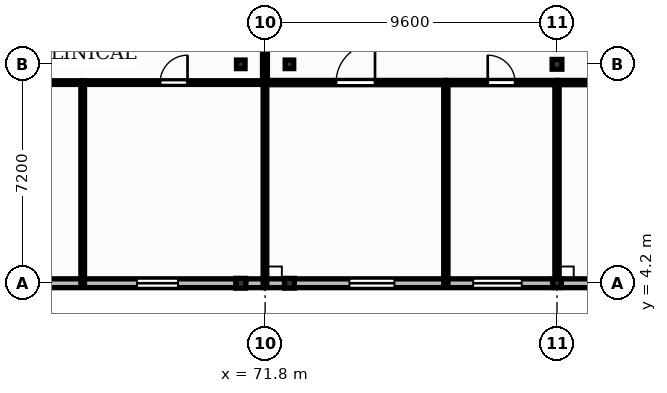
"""IFC4 building model, lengths in metres.
Left out: names, types, materials, properties, quantities, classifications, styles, units other than length and angle.
Written with IfcOpenShell. Run it as: python <this file> out.ifc"""

import sys

from ifc_helpers import new_model, si_unit, direction, frame, frame_2d, origin, origin_2d, place, context, subcontext, project, spatial, rectangle, extrude, element, fill, save


model = new_model("IFC4")
c1 = context("Model", 3, precision=1e-05, world=origin(), true_north=direction((0.0, 1.0)))
c2 = subcontext(c1, "Body", "Model", "MODEL_VIEW")
j1 = project(units=[si_unit("LENGTHUNIT", "METRE"), si_unit("PLANEANGLEUNIT", "RADIAN")], contexts=[c1])
p1 = place(None, origin())
s1 = spatial("IfcSite", under=j1, at=p1, CompositionType="ELEMENT")
p2 = place(p1, origin())
s2 = spatial("IfcBuilding", under=s1, at=p2, CompositionType="ELEMENT")
p3 = place(p2, frame((0.0, 0.0, 13.2)))
s3 = spatial("IfcBuildingStorey", under=s2, at=p3, CompositionType="ELEMENT", Elevation=13.2)
p4 = place(p3, frame((72.6, 4.2, 0.0), z_axis=(0.0, 0.0, 1.0), x_axis=(1.0, 0.0, 0.0)))
e1 = element("IfcColumn", 1, at=p4, inside=s3, PredefinedType="COLUMN", context=c2, shape_type="SweptSolid", body=[
    extrude(rectangle(XDim=0.32, YDim=0.32, at=origin_2d()), origin(), (0.0, 0.0, 1.0), 3.98),
])
p5 = place(p3, frame((72.6, 11.4, 0.0), z_axis=(0.0, 0.0, 1.0), x_axis=(1.0, 0.0, 0.0)))
e2 = element("IfcColumn", 2, at=p5, inside=s3, PredefinedType="COLUMN", context=c2, shape_type="SweptSolid", body=[
    extrude(rectangle(XDim=0.28, YDim=0.28, at=origin_2d()), origin(), (0.0, 0.0, 1.0), 6.045),
])
p6 = place(p3, frame((81.4, 4.2, 0.0), z_axis=(0.0, 0.0, 1.0), x_axis=(1.0, 0.0, 0.0)))
e3 = element("IfcColumn", 3, at=p6, inside=s3, PredefinedType="COLUMN", context=c2, shape_type="SweptSolid", body=[
    extrude(rectangle(XDim=0.28, YDim=0.28, at=origin_2d()), origin(), (0.0, 0.0, 1.0), 3.98),
])
p7 = place(p3, frame((81.4, 11.4, 0.0), z_axis=(0.0, 0.0, 1.0), x_axis=(1.0, 0.0, 0.0)))
e4 = element("IfcColumn", 4, at=p7, inside=s3, PredefinedType="COLUMN", context=c2, shape_type="SweptSolid", body=[
    extrude(rectangle(XDim=0.32, YDim=0.32, at=origin_2d()), origin(), (0.0, 0.0, 1.0), 6.045),
])
p8 = place(p3, frame((71.0, 4.2, 0.0), z_axis=(0.0, 0.0, 1.0), x_axis=(1.0, 0.0, 0.0)))
e5 = element("IfcColumn", 5, at=p8, inside=s3, PredefinedType="COLUMN", context=c2, shape_type="SweptSolid", body=[
    extrude(rectangle(XDim=0.32, YDim=0.32, at=origin_2d()), origin(), (0.0, 0.0, 1.0), 3.98),
])
p9 = place(p3, frame((71.0, 11.4, 0.0), z_axis=(0.0, 0.0, 1.0), x_axis=(1.0, 0.0, 0.0)))
e6 = element("IfcColumn", 6, at=p9, inside=s3, PredefinedType="COLUMN", context=c2, shape_type="SweptSolid", body=[
    extrude(rectangle(XDim=0.28, YDim=0.28, at=origin_2d()), origin(), (0.0, 0.0, 1.0), 6.045),
])
p10 = place(p3, frame((62.34, 4.2, 0.0), z_axis=(0.0, 0.0, 1.0), x_axis=(1.0, 0.0, 0.0)))
e7 = element("IfcWall", 7, at=p10, inside=s3, PredefinedType="SOLIDWALL", context=c2, shape_type="SweptSolid", body=[
    extrude(rectangle(XDim=8.5, YDim=0.29, at=frame_2d((4.25, 0.0))), origin(), (0.0, 0.0, 1.0), 4.0),
])
p11 = place(p10, frame((1.18, 0.0, 1.0)))
e8 = element("IfcOpeningElement", 8, at=p11, cuts=e7, PredefinedType="OPENING", context=c2, shape_type="SweptSolid", body=[
    extrude(rectangle(XDim=1.22, YDim=2.2, at=frame_2d((0.61, 1.1))), frame((0.0, 0.155, 0.0), z_axis=(0.0, -1.0, 0.0), x_axis=(1.0, 0.0, 0.0)), (0.0, 0.0, 1.0), 0.31),
])
p12 = place(p10, frame((5.245, 0.0, 1.0)))
e9 = element("IfcOpeningElement", 9, at=p12, cuts=e7, PredefinedType="OPENING", context=c2, shape_type="SweptSolid", body=[
    extrude(rectangle(XDim=1.35, YDim=2.2, at=frame_2d((0.675, 1.1))), frame((0.0, 0.155, 0.0), z_axis=(0.0, -1.0, 0.0), x_axis=(1.0, 0.0, 0.0)), (0.0, 0.0, 1.0), 0.31),
])
p13 = place(p3, frame((71.16, 4.2, 0.0), z_axis=(0.0, 0.0, 1.0), x_axis=(1.0, 0.0, 0.0)))
e10 = element("IfcWall", 10, at=p13, inside=s3, PredefinedType="SOLIDWALL", context=c2, shape_type="SweptSolid", body=[
    extrude(rectangle(XDim=0.595, YDim=0.29, at=frame_2d((0.297, 0.0))), origin(), (0.0, 0.0, 1.0), 4.0),
])
p14 = place(p3, frame((71.805, 4.2, 0.0), z_axis=(0.0, 0.0, 1.0), x_axis=(1.0, 0.0, 0.0)))
e11 = element("IfcWall", 11, at=p14, inside=s3, PredefinedType="SOLIDWALL", context=c2, shape_type="SweptSolid", body=[
    extrude(rectangle(XDim=0.635, YDim=0.29, at=frame_2d((0.317, 0.0))), origin(), (0.0, 0.0, 1.0), 4.0),
])
p15 = place(p3, frame((72.76, 4.2, 0.0), z_axis=(0.0, 0.0, 1.0), x_axis=(1.0, 0.0, 0.0)))
e12 = element("IfcWall", 12, at=p15, inside=s3, PredefinedType="SOLIDWALL", context=c2, shape_type="SweptSolid", body=[
    extrude(rectangle(XDim=8.5, YDim=0.29, at=frame_2d((4.25, 0.0))), origin(), (0.0, 0.0, 1.0), 4.0),
])
p16 = place(p15, frame((1.812, 0.0, 1.0)))
e13 = element("IfcOpeningElement", 13, at=p16, cuts=e12, PredefinedType="OPENING", context=c2, shape_type="SweptSolid", body=[
    extrude(rectangle(XDim=1.48, YDim=2.2, at=frame_2d((0.74, 1.1))), frame((0.0, 0.155, 0.0), z_axis=(0.0, -1.0, 0.0), x_axis=(1.0, 0.0, 0.0)), (0.0, 0.0, 1.0), 0.31),
])
p17 = place(p15, frame((5.882, 0.0, 1.0)))
e14 = element("IfcOpeningElement", 14, at=p17, cuts=e12, PredefinedType="OPENING", context=c2, shape_type="SweptSolid", body=[
    extrude(rectangle(XDim=1.6, YDim=2.2, at=frame_2d((0.8, 1.1))), frame((0.0, 0.155, 0.0), z_axis=(0.0, -1.0, 0.0), x_axis=(1.0, 0.0, 0.0)), (0.0, 0.0, 1.0), 0.31),
])
p18 = place(p3, frame((81.54, 4.2, 0.0), z_axis=(0.0, 0.0, 1.0), x_axis=(1.0, 0.0, 0.0)))
e15 = element("IfcWall", 15, at=p18, inside=s3, PredefinedType="SOLIDWALL", context=c2, shape_type="SweptSolid", body=[
    extrude(rectangle(XDim=4.54, YDim=0.29, at=frame_2d((2.27, 0.0))), origin(), (0.0, 0.0, 1.0), 4.0),
])
p19 = place(p18, frame((1.41, 0.0, 1.0)))
e16 = element("IfcOpeningElement", 16, at=p19, cuts=e15, PredefinedType="OPENING", context=c2, shape_type="SweptSolid", body=[
    extrude(rectangle(XDim=1.72, YDim=2.2, at=frame_2d((0.86, 1.1))), frame((0.0, 0.155, 0.0), z_axis=(0.0, -1.0, 0.0), x_axis=(1.0, 0.0, 0.0)), (0.0, 0.0, 1.0), 0.31),
])
p20 = place(p3, frame((62.2, 10.8, 0.0), z_axis=(0.0, 0.0, 1.0), x_axis=(1.0, 0.0, 0.0)))
e17 = element("IfcWall", 17, at=p20, inside=s3, PredefinedType="PLUMBINGWALL", context=c2, shape_type="SweptSolid", body=[
    extrude(rectangle(XDim=3.6, YDim=0.12, at=frame_2d((1.8, 0.0))), origin(), (0.0, 0.0, 1.0), 3.75),
])
p21 = place(p20, frame((1.35, 0.0, 0.0)))
e18 = element("IfcOpeningElement", 18, at=p21, cuts=e17, PredefinedType="OPENING", context=c2, shape_type="SweptSolid", body=[
    extrude(rectangle(XDim=0.9, YDim=2.1, at=frame_2d((0.45, 1.05))), frame((0.0, 0.07, 0.0), z_axis=(0.0, -1.0, 0.0), x_axis=(1.0, 0.0, 0.0)), (0.0, 0.0, 1.0), 0.14),
])
p22 = place(p3, frame((65.8, 4.2, 0.0), z_axis=(0.0, 0.0, 1.0), x_axis=(0.0, 1.0, 0.0)))
e19 = element("IfcWall", 19, at=p22, inside=s3, PredefinedType="PLUMBINGWALL", context=c2, shape_type="SweptSolid", body=[
    extrude(rectangle(XDim=6.53, YDim=0.12, at=frame_2d((3.265, 0.0))), origin(), (0.0, 0.0, 1.0), 3.75),
])
p23 = place(p3, frame((65.8, 10.8, 0.0), z_axis=(0.0, 0.0, 1.0), x_axis=(1.0, 0.0, 0.0)))
e20 = element("IfcWall", 20, at=p23, inside=s3, PredefinedType="PLUMBINGWALL", context=c2, shape_type="SweptSolid", body=[
    extrude(rectangle(XDim=5.995, YDim=0.12, at=frame_2d((2.998, 0.0))), origin(), (0.0, 0.0, 1.0), 3.75),
])
p24 = place(p23, frame((2.548, 0.0, 0.0)))
e21 = element("IfcOpeningElement", 21, at=p24, cuts=e20, PredefinedType="OPENING", context=c2, shape_type="SweptSolid", body=[
    extrude(rectangle(XDim=0.9, YDim=2.1, at=frame_2d((0.45, 1.05))), frame((0.0, 0.07, 0.0), z_axis=(0.0, -1.0, 0.0), x_axis=(1.0, 0.0, 0.0)), (0.0, 0.0, 1.0), 0.14),
])
p25 = place(p3, frame((71.805, 10.8, 0.0), z_axis=(0.0, 0.0, 1.0), x_axis=(1.0, 0.0, 0.0)))
e22 = element("IfcWall", 22, at=p25, inside=s3, PredefinedType="PARTITIONING", context=c2, shape_type="SweptSolid", body=[
    extrude(rectangle(XDim=5.939, YDim=0.14, at=frame_2d((2.969, 0.0))), origin(), (0.0, 0.0, 1.0), 3.75),
])
p26 = place(p25, frame((2.33, 0.0, 0.0)))
e23 = element("IfcOpeningElement", 23, at=p26, cuts=e22, PredefinedType="OPENING", context=c2, shape_type="SweptSolid", body=[
    extrude(rectangle(XDim=1.28, YDim=2.2, at=frame_2d((0.64, 1.1))), frame((0.0, 0.08, 0.0), z_axis=(0.0, -1.0, 0.0), x_axis=(1.0, 0.0, 0.0)), (0.0, 0.0, 1.0), 0.16),
])
p27 = place(p3, frame((77.744, 4.2, 0.0), z_axis=(0.0, 0.0, 1.0), x_axis=(0.0, 1.0, 0.0)))
e24 = element("IfcWall", 24, at=p27, inside=s3, PredefinedType="PARTITIONING", context=c2, shape_type="SweptSolid", body=[
    extrude(rectangle(XDim=6.53, YDim=0.14, at=frame_2d((3.265, 0.0))), origin(), (0.0, 0.0, 1.0), 3.75),
])
p28 = place(p3, frame((77.744, 10.8, 0.0), z_axis=(0.0, 0.0, 1.0), x_axis=(1.0, 0.0, 0.0)))
e25 = element("IfcWall", 25, at=p28, inside=s3, PredefinedType="PARTITIONING", context=c2, shape_type="SweptSolid", body=[
    extrude(rectangle(XDim=3.656, YDim=0.14, at=frame_2d((1.828, 0.0))), origin(), (0.0, 0.0, 1.0), 3.75),
])
p29 = place(p28, frame((1.378, 0.0, 0.0)))
e26 = element("IfcOpeningElement", 26, at=p29, cuts=e25, PredefinedType="OPENING", context=c2, shape_type="SweptSolid", body=[
    extrude(rectangle(XDim=0.9, YDim=2.1, at=frame_2d((0.45, 1.05))), frame((0.0, 0.08, 0.0), z_axis=(0.0, -1.0, 0.0), x_axis=(1.0, 0.0, 0.0)), (0.0, 0.0, 1.0), 0.16),
])
p30 = place(p3, frame((81.4, 4.34, 0.0), z_axis=(0.0, 0.0, 1.0), x_axis=(0.0, 1.0, 0.0)))
e27 = element("IfcWall", 27, at=p30, inside=s3, PredefinedType="PARTITIONING", context=c2, shape_type="SweptSolid", body=[
    extrude(rectangle(XDim=6.39, YDim=0.14, at=frame_2d((3.195, 0.0))), origin(), (0.0, 0.0, 1.0), 3.75),
])
p31 = place(p3, frame((81.4, 10.8, 0.0), z_axis=(0.0, 0.0, 1.0), x_axis=(1.0, 0.0, 0.0)))
e28 = element("IfcWall", 28, at=p31, inside=s3, PredefinedType="PARTITIONING", context=c2, shape_type="SweptSolid", body=[
    extrude(rectangle(XDim=7.2, YDim=0.14, at=frame_2d((3.6, 0.0))), origin(), (0.0, 0.0, 1.0), 3.75),
])
p32 = place(p31, frame((3.15, 0.0, 0.0)))
e29 = element("IfcOpeningElement", 29, at=p32, cuts=e28, PredefinedType="OPENING", context=c2, shape_type="SweptSolid", body=[
    extrude(rectangle(XDim=0.9, YDim=2.1, at=frame_2d((0.45, 1.05))), frame((0.0, 0.08, 0.0), z_axis=(0.0, -1.0, 0.0), x_axis=(1.0, 0.0, 0.0)), (0.0, 0.0, 1.0), 0.16),
])
p33 = place(p3, frame((71.795, 10.87, 0.0), z_axis=(0.0, 0.0, 1.0), x_axis=(0.0, 1.0, 0.0)))
e30 = element("IfcWall", 30, at=p33, inside=s3, PredefinedType="PARTITIONING", context=c2, shape_type="SweptSolid", body=[
    extrude(rectangle(XDim=2.46, YDim=0.16, at=frame_2d((1.23, 0.0))), origin(), (0.0, 0.0, 1.0), 3.75),
])
p34 = place(p3, frame((71.795, 4.2, 0.0), z_axis=(0.0, 0.0, 1.0), x_axis=(0.0, 1.0, 0.0)))
e31 = element("IfcWall", 31, at=p34, inside=s3, PredefinedType="PLUMBINGWALL", context=c2, shape_type="SweptSolid", body=[
    extrude(rectangle(XDim=6.53, YDim=0.12, at=frame_2d((3.265, 0.0))), origin(), (0.0, 0.0, 1.0), 3.75),
])
p35 = place(p12, origin())
e32 = element("IfcWindow", 32, at=p35, inside=s3, PartitioningType="SINGLE_PANEL", PredefinedType="WINDOW", context=c2, shape_type="SweptSolid", body=[
    extrude(rectangle(XDim=1.35, YDim=2.2, at=frame_2d((0.675, 1.1))), frame((0.0, 0.03, 0.0), z_axis=(0.0, -1.0, 0.0), x_axis=(1.0, 0.0, 0.0)), (0.0, 0.0, 1.0), 0.06),
])
fill(e9, e32)
p36 = place(p16, origin())
e33 = element("IfcWindow", 33, at=p36, inside=s3, PartitioningType="SINGLE_PANEL", PredefinedType="WINDOW", context=c2, shape_type="SweptSolid", body=[
    extrude(rectangle(XDim=1.48, YDim=2.2, at=frame_2d((0.74, 1.1))), frame((0.0, 0.03, 0.0), z_axis=(0.0, -1.0, 0.0), x_axis=(1.0, 0.0, 0.0)), (0.0, 0.0, 1.0), 0.06),
])
fill(e13, e33)
p37 = place(p17, origin())
e34 = element("IfcWindow", 34, at=p37, inside=s3, PartitioningType="DOUBLE_PANEL_VERTICAL", PredefinedType="WINDOW", context=c2, shape_type="SweptSolid", body=[
    extrude(rectangle(XDim=1.6, YDim=2.2, at=frame_2d((0.8, 1.1))), frame((0.0, 0.03, 0.0), z_axis=(0.0, -1.0, 0.0), x_axis=(1.0, 0.0, 0.0)), (0.0, 0.0, 1.0), 0.06),
])
fill(e14, e34)
p38 = place(p24, origin())
e35 = element("IfcDoor", 35, at=p38, inside=s3, OperationType="SINGLE_SWING_RIGHT", PredefinedType="DOOR", context=c2, shape_type="SweptSolid", body=[
    extrude(rectangle(XDim=0.9, YDim=2.1, at=frame_2d((0.45, 1.05))), frame((0.0, 0.025, 0.0), z_axis=(0.0, -1.0, 0.0), x_axis=(1.0, 0.0, 0.0)), (0.0, 0.0, 1.0), 0.05),
])
fill(e21, e35)
p39 = place(p26, origin())
e36 = element("IfcDoor", 36, at=p39, inside=s3, OperationType="SINGLE_SWING_RIGHT", PredefinedType="DOOR", context=c2, shape_type="SweptSolid", body=[
    extrude(rectangle(XDim=1.28, YDim=2.2, at=frame_2d((0.64, 1.1))), frame((0.0, 0.025, 0.0), z_axis=(0.0, -1.0, 0.0), x_axis=(1.0, 0.0, 0.0)), (0.0, 0.0, 1.0), 0.05),
])
fill(e23, e36)
p40 = place(p29, origin())
e37 = element("IfcDoor", 37, at=p40, inside=s3, OperationType="SINGLE_SWING_LEFT", PredefinedType="DOOR", context=c2, shape_type="SweptSolid", body=[
    extrude(rectangle(XDim=0.9, YDim=2.1, at=frame_2d((0.45, 1.05))), frame((0.0, 0.025, 0.0), z_axis=(0.0, -1.0, 0.0), x_axis=(1.0, 0.0, 0.0)), (0.0, 0.0, 1.0), 0.05),
])
fill(e26, e37)
save(model, sys.argv[1])
